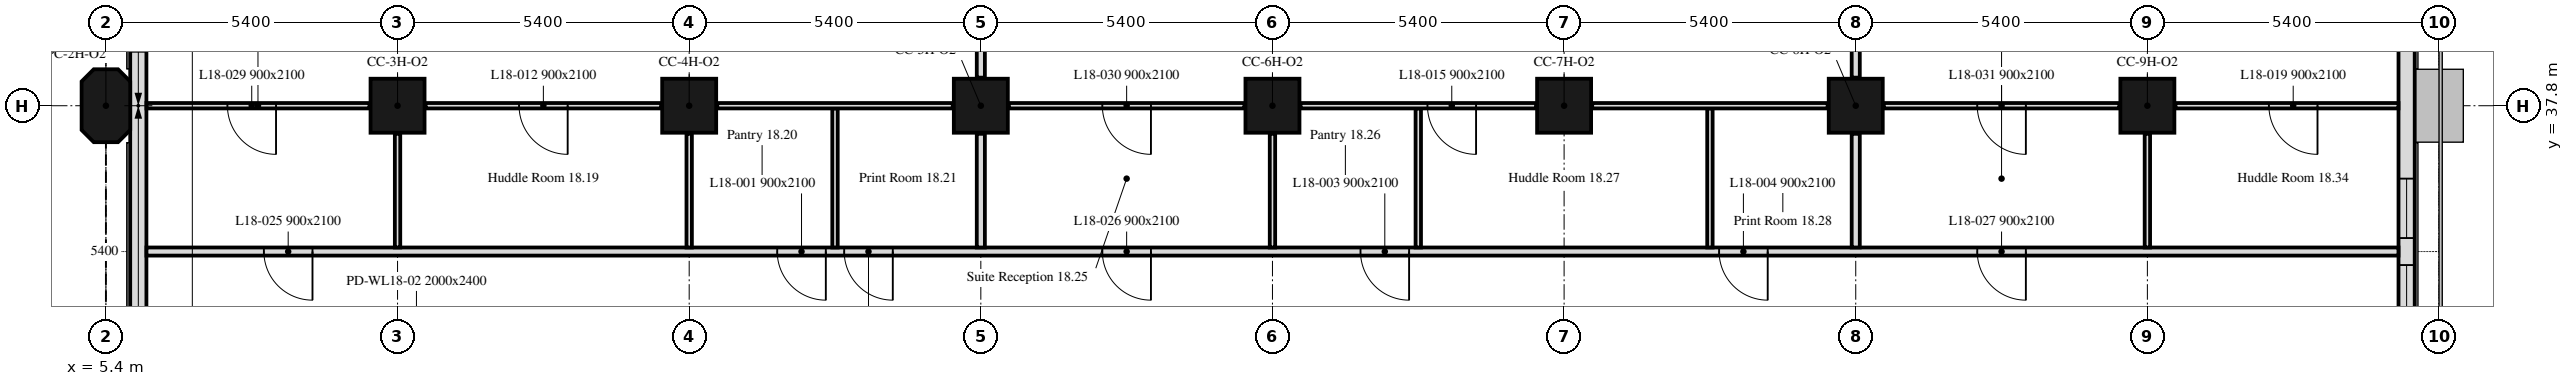
"""IFC4 building model, lengths in metres.
Left out: names, types, materials, properties, quantities, classifications, styles, units other than length and angle.
Written with IfcOpenShell. Run it as: python <this file> out.ifc"""

import sys

from ifc_helpers import new_model, si_unit, direction, frame, frame_2d, origin, origin_2d, place, context, subcontext, project, spatial, polyline, rectangle, outline, extrude, element, fill, save


model = new_model("IFC4")
c1 = context("Model", 3, precision=1e-05, world=origin(), true_north=direction((0.0, 1.0)))
c2 = subcontext(c1, "Body", "Model", "MODEL_VIEW")
j1 = project(units=[si_unit("LENGTHUNIT", "METRE"), si_unit("PLANEANGLEUNIT", "RADIAN")], contexts=[c1])
p1 = place(None, origin())
s1 = spatial("IfcSite", under=j1, at=p1, CompositionType="ELEMENT")
p2 = place(p1, origin())
s2 = spatial("IfcBuilding", under=s1, at=p2, CompositionType="ELEMENT")
p3 = place(p2, frame((0.0, 0.0, 80.2)))
s3 = spatial("IfcBuildingStorey", under=s2, at=p3, CompositionType="ELEMENT", Elevation=80.2)
p4 = place(p3, frame((5.4, 37.8, 0.0), z_axis=(0.0, 0.0, 1.0), x_axis=(0.0, 1.0, 0.0)))
e1 = element("IfcColumn", 1, at=p4, inside=s3, PredefinedType="COLUMN", context=c2, shape_type="SweptSolid", body=[
    extrude(outline(polyline([(-0.45, -0.45), (0.45, -0.45), (0.675, -0.225), (0.675, 0.225), (0.45, 0.45), (-0.45, 0.45), (-0.675, 0.225), (-0.675, -0.225), (-0.45, -0.45)])), origin(), (0.0, 0.0, 1.0), 3.5),
])
for number, where, z_axis, x_axis in (
    (2, (10.8, 37.8, 0.0), (0.0, 0.0, 1.0), (1.0, 0.0, 0.0)),
    (3, (16.2, 37.8, 0.0), (0.0, 0.0, 1.0), (1.0, 0.0, 0.0)),
    (4, (21.6, 37.8, 0.0), (0.0, 0.0, 1.0), (1.0, 0.0, 0.0)),
    (5, (27.0, 37.8, 0.0), (0.0, 0.0, 1.0), (1.0, 0.0, 0.0)),
    (6, (32.4, 37.8, 0.0), (0.0, 0.0, 1.0), (1.0, 0.0, 0.0)),
    (7, (37.8, 37.8, 0.0), (0.0, 0.0, 1.0), (1.0, 0.0, 0.0)),
    (8, (43.2, 37.8, 0.0), (0.0, 0.0, 1.0), (1.0, 0.0, 0.0)),
):
    element("IfcColumn", number, at=place(p3, frame(where, z_axis=z_axis, x_axis=x_axis)), inside=s3, PredefinedType="COLUMN", context=c2, shape_type="SweptSolid", body=[
        extrude(rectangle(XDim=1.0, YDim=1.0, at=origin_2d()), origin(), (0.0, 0.0, 1.0), 3.5),
    ])
p5 = place(p3, frame((48.0, 10.986, 0.0), z_axis=(0.0, 0.0, 1.0), x_axis=(0.0, 1.0, 0.0)))
e9 = element("IfcWall", 9, at=p5, inside=s3, PredefinedType="SOLIDWALL", context=c2, shape_type="SweptSolid", body=[
    extrude(rectangle(XDim=32.027, YDim=0.3, at=frame_2d((16.014, 0.0))), origin(), (0.0, 0.0, 1.0), 3.5),
])
p6 = place(p5, frame((1.164, 0.0, 0.9)))
e10 = element("IfcOpeningElement", 10, at=p6, cuts=e9, PredefinedType="OPENING", context=c2, shape_type="SweptSolid", body=[
    extrude(rectangle(XDim=1.1, YDim=1.7, at=frame_2d((0.55, 0.85))), frame((0.0, 0.16, 0.0), z_axis=(0.0, -1.0, 0.0), x_axis=(1.0, 0.0, 0.0)), (0.0, 0.0, 1.0), 0.32),
])
p7 = place(p5, frame((2.764, 0.0, 0.9)))
e11 = element("IfcOpeningElement", 11, at=p7, cuts=e9, PredefinedType="OPENING", context=c2, shape_type="SweptSolid", body=[
    extrude(rectangle(XDim=1.1, YDim=1.7, at=frame_2d((0.55, 0.85))), frame((0.0, 0.16, 0.0), z_axis=(0.0, -1.0, 0.0), x_axis=(1.0, 0.0, 0.0)), (0.0, 0.0, 1.0), 0.32),
])
p8 = place(p5, frame((11.614, 0.0, 0.9)))
e12 = element("IfcOpeningElement", 12, at=p8, cuts=e9, PredefinedType="OPENING", context=c2, shape_type="SweptSolid", body=[
    extrude(rectangle(XDim=3.4, YDim=1.7, at=frame_2d((1.7, 0.85))), frame((0.0, 0.16, 0.0), z_axis=(0.0, -1.0, 0.0), x_axis=(1.0, 0.0, 0.0)), (0.0, 0.0, 1.0), 0.32),
])
p9 = place(p5, frame((22.764, 0.0, 0.9)))
e13 = element("IfcOpeningElement", 13, at=p9, cuts=e9, PredefinedType="OPENING", context=c2, shape_type="SweptSolid", body=[
    extrude(rectangle(XDim=1.1, YDim=1.7, at=frame_2d((0.55, 0.85))), frame((0.0, 0.16, 0.0), z_axis=(0.0, -1.0, 0.0), x_axis=(1.0, 0.0, 0.0)), (0.0, 0.0, 1.0), 0.32),
])
p10 = place(p5, frame((24.364, 0.0, 0.9)))
e14 = element("IfcOpeningElement", 14, at=p10, cuts=e9, PredefinedType="OPENING", context=c2, shape_type="SweptSolid", body=[
    extrude(rectangle(XDim=1.1, YDim=1.7, at=frame_2d((0.55, 0.85))), frame((0.0, 0.16, 0.0), z_axis=(0.0, -1.0, 0.0), x_axis=(1.0, 0.0, 0.0)), (0.0, 0.0, 1.0), 0.32),
])
p11 = place(p3, frame((6.0, 43.014, 0.0), z_axis=(0.0, 0.0, 1.0), x_axis=(0.0, -1.0, 0.0)))
e15 = element("IfcWall", 15, at=p11, inside=s3, PredefinedType="SOLIDWALL", context=c2, shape_type="SweptSolid", body=[
    extrude(rectangle(XDim=10.614, YDim=0.3, at=frame_2d((5.307, 0.0))), origin(), (0.0, 0.0, 1.0), 3.5),
])
p12 = place(p11, frame((0.814, 0.0, 0.9)))
e16 = element("IfcOpeningElement", 16, at=p12, cuts=e15, PredefinedType="OPENING", context=c2, shape_type="SweptSolid", body=[
    extrude(rectangle(XDim=3.4, YDim=1.7, at=frame_2d((1.7, 0.85))), frame((0.0, 0.16, 0.0), z_axis=(0.0, -1.0, 0.0), x_axis=(1.0, 0.0, 0.0)), (0.0, 0.0, 1.0), 0.32),
])
p13 = place(p3, frame((47.849, 35.1, 0.0), z_axis=(0.0, 0.0, 1.0), x_axis=(-1.0, 0.0, 0.0)))
e17 = element("IfcWall", 17, at=p13, inside=s3, PredefinedType="PARTITIONING", context=c2, shape_type="SweptSolid", body=[
    extrude(rectangle(XDim=41.698, YDim=0.15, at=frame_2d((20.849, 0.0))), origin(), (0.0, 0.0, 1.0), 2.75),
])
p14 = place(p13, frame((29.119, 0.0, 0.0)))
e18 = element("IfcOpeningElement", 18, at=p14, cuts=e17, PredefinedType="OPENING", context=c2, shape_type="SweptSolid", body=[
    extrude(rectangle(XDim=0.9, YDim=2.1, at=frame_2d((0.45, 1.05))), frame((0.0, 0.075, 0.0), z_axis=(0.0, -1.0, 0.0), x_axis=(1.0, 0.0, 0.0)), (0.0, 0.0, 1.0), 0.15),
])
p15 = place(p13, frame((27.879, 0.0, 0.0)))
e19 = element("IfcOpeningElement", 19, at=p15, cuts=e17, PredefinedType="OPENING", context=c2, shape_type="SweptSolid", body=[
    extrude(rectangle(XDim=0.9, YDim=2.1, at=frame_2d((0.45, 1.05))), frame((0.0, 0.075, 0.0), z_axis=(0.0, -1.0, 0.0), x_axis=(1.0, 0.0, 0.0)), (0.0, 0.0, 1.0), 0.15),
])
p16 = place(p13, frame((18.319, 0.0, 0.0)))
e20 = element("IfcOpeningElement", 20, at=p16, cuts=e17, PredefinedType="OPENING", context=c2, shape_type="SweptSolid", body=[
    extrude(rectangle(XDim=0.9, YDim=2.1, at=frame_2d((0.45, 1.05))), frame((0.0, 0.075, 0.0), z_axis=(0.0, -1.0, 0.0), x_axis=(1.0, 0.0, 0.0)), (0.0, 0.0, 1.0), 0.15),
])
p17 = place(p13, frame((11.679, 0.0, 0.0)))
e21 = element("IfcOpeningElement", 21, at=p17, cuts=e17, PredefinedType="OPENING", context=c2, shape_type="SweptSolid", body=[
    extrude(rectangle(XDim=0.9, YDim=2.1, at=frame_2d((0.45, 1.05))), frame((0.0, 0.075, 0.0), z_axis=(0.0, -1.0, 0.0), x_axis=(1.0, 0.0, 0.0)), (0.0, 0.0, 1.0), 0.15),
])
p18 = place(p13, frame((38.624, 0.0, 0.0)))
e22 = element("IfcOpeningElement", 22, at=p18, cuts=e17, PredefinedType="OPENING", context=c2, shape_type="SweptSolid", body=[
    extrude(rectangle(XDim=0.9, YDim=2.1, at=frame_2d((0.45, 1.05))), frame((0.0, 0.075, 0.0), z_axis=(0.0, -1.0, 0.0), x_axis=(1.0, 0.0, 0.0)), (0.0, 0.0, 1.0), 0.15),
])
p19 = place(p13, frame((23.099, 0.0, 0.0)))
e23 = element("IfcOpeningElement", 23, at=p19, cuts=e17, PredefinedType="OPENING", context=c2, shape_type="SweptSolid", body=[
    extrude(rectangle(XDim=0.9, YDim=2.1, at=frame_2d((0.45, 1.05))), frame((0.0, 0.075, 0.0), z_axis=(0.0, -1.0, 0.0), x_axis=(1.0, 0.0, 0.0)), (0.0, 0.0, 1.0), 0.15),
])
p20 = place(p13, frame((6.899, 0.0, 0.0)))
e24 = element("IfcOpeningElement", 24, at=p20, cuts=e17, PredefinedType="OPENING", context=c2, shape_type="SweptSolid", body=[
    extrude(rectangle(XDim=0.9, YDim=2.1, at=frame_2d((0.45, 1.05))), frame((0.0, 0.075, 0.0), z_axis=(0.0, -1.0, 0.0), x_axis=(1.0, 0.0, 0.0)), (0.0, 0.0, 1.0), 0.15),
])
p21 = place(p3, frame((10.28, 37.8, 0.0), z_axis=(0.0, 0.0, 1.0), x_axis=(-1.0, 0.0, 0.0)))
e25 = element("IfcWall", 25, at=p21, inside=s3, PredefinedType="PARTITIONING", context=c2, shape_type="SweptSolid", body=[
    extrude(rectangle(XDim=4.129, YDim=0.1, at=frame_2d((2.064, 0.0))), origin(), (0.0, 0.0, 1.0), 3.5),
])
p22 = place(p21, frame((1.73, 0.0, 0.0)))
e26 = element("IfcOpeningElement", 26, at=p22, cuts=e25, PredefinedType="OPENING", context=c2, shape_type="SweptSolid", body=[
    extrude(rectangle(XDim=0.9, YDim=2.1, at=frame_2d((0.45, 1.05))), frame((0.0, 0.05, 0.0), z_axis=(0.0, -1.0, 0.0), x_axis=(1.0, 0.0, 0.0)), (0.0, 0.0, 1.0), 0.1),
])
p23 = place(p3, frame((10.8, 35.175, 0.0), z_axis=(0.0, 0.0, 1.0), x_axis=(0.0, 1.0, 0.0)))
e27 = element("IfcWall", 27, at=p23, inside=s3, PredefinedType="PARTITIONING", context=c2, shape_type="SweptSolid", body=[
    extrude(rectangle(XDim=2.105, YDim=0.1, at=frame_2d((1.052, 0.0))), origin(), (0.0, 0.0, 1.0), 3.5),
])
p24 = place(p3, frame((16.2, 35.175, 0.0), z_axis=(0.0, 0.0, 1.0), x_axis=(0.0, 1.0, 0.0)))
e28 = element("IfcWall", 28, at=p24, inside=s3, PredefinedType="PARTITIONING", context=c2, shape_type="SweptSolid", body=[
    extrude(rectangle(XDim=2.105, YDim=0.1, at=frame_2d((1.052, 0.0))), origin(), (0.0, 0.0, 1.0), 2.75),
])
p25 = place(p3, frame((15.68, 37.8, 0.0), z_axis=(0.0, 0.0, 1.0), x_axis=(-1.0, 0.0, 0.0)))
e29 = element("IfcWall", 29, at=p25, inside=s3, PredefinedType="PARTITIONING", context=c2, shape_type="SweptSolid", body=[
    extrude(rectangle(XDim=4.36, YDim=0.1, at=frame_2d((2.18, 0.0))), origin(), (0.0, 0.0, 1.0), 3.5),
])
p26 = place(p25, frame((1.73, 0.0, 0.0)))
e30 = element("IfcOpeningElement", 30, at=p26, cuts=e29, PredefinedType="OPENING", context=c2, shape_type="SweptSolid", body=[
    extrude(rectangle(XDim=0.9, YDim=2.1, at=frame_2d((0.45, 1.05))), frame((0.0, 0.05, 0.0), z_axis=(0.0, -1.0, 0.0), x_axis=(1.0, 0.0, 0.0)), (0.0, 0.0, 1.0), 0.1),
])
p27 = place(p3, frame((18.9, 35.175, 0.0), z_axis=(0.0, 0.0, 1.0), x_axis=(0.0, 1.0, 0.0)))
e31 = element("IfcWall", 31, at=p27, inside=s3, PredefinedType="PARTITIONING", context=c2, shape_type="SweptSolid", body=[
    extrude(rectangle(XDim=2.575, YDim=0.1, at=frame_2d((1.288, 0.0))), origin(), (0.0, 0.0, 1.0), 3.5),
])
p28 = place(p3, frame((21.6, 35.175, 0.0), z_axis=(0.0, 0.0, 1.0), x_axis=(0.0, 1.0, 0.0)))
e32 = element("IfcWall", 32, at=p28, inside=s3, PredefinedType="PARTITIONING", context=c2, shape_type="SweptSolid", body=[
    extrude(rectangle(XDim=2.105, YDim=0.15, at=frame_2d((1.052, 0.0))), origin(), (0.0, 0.0, 1.0), 2.75),
])
p29 = place(p3, frame((21.08, 37.8, 0.0), z_axis=(0.0, 0.0, 1.0), x_axis=(-1.0, 0.0, 0.0)))
e33 = element("IfcWall", 33, at=p29, inside=s3, PredefinedType="PARTITIONING", context=c2, shape_type="SweptSolid", body=[
    extrude(rectangle(XDim=4.36, YDim=0.1, at=frame_2d((2.18, 0.0))), origin(), (0.0, 0.0, 1.0), 3.5),
])
p30 = place(p3, frame((21.6, 38.32, 0.0), z_axis=(0.0, 0.0, 1.0), x_axis=(0.0, 1.0, 0.0)))
e34 = element("IfcWall", 34, at=p30, inside=s3, PredefinedType="PARTITIONING", context=c2, shape_type="SweptSolid", body=[
    extrude(rectangle(XDim=4.36, YDim=0.15, at=frame_2d((2.18, 0.0))), origin(), (0.0, 0.0, 1.0), 2.75),
])
p31 = place(p3, frame((27.0, 35.175, 0.0), z_axis=(0.0, 0.0, 1.0), x_axis=(0.0, 1.0, 0.0)))
e35 = element("IfcWall", 35, at=p31, inside=s3, PredefinedType="PARTITIONING", context=c2, shape_type="SweptSolid", body=[
    extrude(rectangle(XDim=2.105, YDim=0.1, at=frame_2d((1.052, 0.0))), origin(), (0.0, 0.0, 1.0), 2.75),
])
p32 = place(p3, frame((26.48, 37.8, 0.0), z_axis=(0.0, 0.0, 1.0), x_axis=(-1.0, 0.0, 0.0)))
e36 = element("IfcWall", 36, at=p32, inside=s3, PredefinedType="PARTITIONING", context=c2, shape_type="SweptSolid", body=[
    extrude(rectangle(XDim=4.36, YDim=0.1, at=frame_2d((2.18, 0.0))), origin(), (0.0, 0.0, 1.0), 3.5),
])
p33 = place(p32, frame((1.73, 0.0, 0.0)))
e37 = element("IfcOpeningElement", 37, at=p33, cuts=e36, PredefinedType="OPENING", context=c2, shape_type="SweptSolid", body=[
    extrude(rectangle(XDim=0.9, YDim=2.1, at=frame_2d((0.45, 1.05))), frame((0.0, 0.05, 0.0), z_axis=(0.0, -1.0, 0.0), x_axis=(1.0, 0.0, 0.0)), (0.0, 0.0, 1.0), 0.1),
])
for number, where, z_axis, x_axis in (
    (38, (29.7, 35.175, 0.0), (0.0, 0.0, 1.0), (0.0, 1.0, 0.0)),
    (39, (35.1, 35.175, 0.0), (0.0, 0.0, 1.0), (0.0, 1.0, 0.0)),
):
    element("IfcWall", number, at=place(p3, frame(where, z_axis=z_axis, x_axis=x_axis)), inside=s3, PredefinedType="PARTITIONING", context=c2, shape_type="SweptSolid", body=[
        extrude(rectangle(XDim=2.575, YDim=0.1, at=frame_2d((1.288, 0.0))), origin(), (0.0, 0.0, 1.0), 3.5),
    ])
p34 = place(p3, frame((31.88, 37.8, 0.0), z_axis=(0.0, 0.0, 1.0), x_axis=(-1.0, 0.0, 0.0)))
e40 = element("IfcWall", 40, at=p34, inside=s3, PredefinedType="PARTITIONING", context=c2, shape_type="SweptSolid", body=[
    extrude(rectangle(XDim=4.36, YDim=0.1, at=frame_2d((2.18, 0.0))), origin(), (0.0, 0.0, 1.0), 3.5),
])
p35 = place(p34, frame((1.11, 0.0, 0.0)))
e41 = element("IfcOpeningElement", 41, at=p35, cuts=e40, PredefinedType="OPENING", context=c2, shape_type="SweptSolid", body=[
    extrude(rectangle(XDim=0.9, YDim=2.1, at=frame_2d((0.45, 1.05))), frame((0.0, 0.05, 0.0), z_axis=(0.0, -1.0, 0.0), x_axis=(1.0, 0.0, 0.0)), (0.0, 0.0, 1.0), 0.1),
])
p36 = place(p3, frame((37.8, 35.175, 0.0), z_axis=(0.0, 0.0, 1.0), x_axis=(0.0, 1.0, 0.0)))
e42 = element("IfcWall", 42, at=p36, inside=s3, PredefinedType="PARTITIONING", context=c2, shape_type="SweptSolid", body=[
    extrude(rectangle(XDim=2.105, YDim=0.15, at=frame_2d((1.052, 0.0))), origin(), (0.0, 0.0, 1.0), 2.75),
])
p37 = place(p3, frame((37.28, 37.8, 0.0), z_axis=(0.0, 0.0, 1.0), x_axis=(-1.0, 0.0, 0.0)))
e43 = element("IfcWall", 43, at=p37, inside=s3, PredefinedType="PARTITIONING", context=c2, shape_type="SweptSolid", body=[
    extrude(rectangle(XDim=4.36, YDim=0.1, at=frame_2d((2.18, 0.0))), origin(), (0.0, 0.0, 1.0), 2.75),
])
p38 = place(p3, frame((37.8, 38.32, 0.0), z_axis=(0.0, 0.0, 1.0), x_axis=(0.0, 1.0, 0.0)))
e44 = element("IfcWall", 44, at=p38, inside=s3, PredefinedType="PARTITIONING", context=c2, shape_type="SweptSolid", body=[
    extrude(rectangle(XDim=4.36, YDim=0.15, at=frame_2d((2.18, 0.0))), origin(), (0.0, 0.0, 1.0), 2.75),
])
p39 = place(p3, frame((43.2, 35.175, 0.0), z_axis=(0.0, 0.0, 1.0), x_axis=(0.0, 1.0, 0.0)))
e45 = element("IfcWall", 45, at=p39, inside=s3, PredefinedType="PARTITIONING", context=c2, shape_type="SweptSolid", body=[
    extrude(rectangle(XDim=2.105, YDim=0.1, at=frame_2d((1.052, 0.0))), origin(), (0.0, 0.0, 1.0), 3.5),
])
p40 = place(p3, frame((42.68, 37.8, 0.0), z_axis=(0.0, 0.0, 1.0), x_axis=(-1.0, 0.0, 0.0)))
e46 = element("IfcWall", 46, at=p40, inside=s3, PredefinedType="PARTITIONING", context=c2, shape_type="SweptSolid", body=[
    extrude(rectangle(XDim=4.36, YDim=0.1, at=frame_2d((2.18, 0.0))), origin(), (0.0, 0.0, 1.0), 2.75),
])
p41 = place(p40, frame((1.73, 0.0, 0.0)))
e47 = element("IfcOpeningElement", 47, at=p41, cuts=e46, PredefinedType="OPENING", context=c2, shape_type="SweptSolid", body=[
    extrude(rectangle(XDim=0.9, YDim=2.1, at=frame_2d((0.45, 1.05))), frame((0.0, 0.05, 0.0), z_axis=(0.0, -1.0, 0.0), x_axis=(1.0, 0.0, 0.0)), (0.0, 0.0, 1.0), 0.1),
])
p42 = place(p3, frame((47.849, 37.8, 0.0), z_axis=(0.0, 0.0, 1.0), x_axis=(-1.0, 0.0, 0.0)))
e48 = element("IfcWall", 48, at=p42, inside=s3, PredefinedType="PARTITIONING", context=c2, shape_type="SweptSolid", body=[
    extrude(rectangle(XDim=4.129, YDim=0.1, at=frame_2d((2.064, 0.0))), origin(), (0.0, 0.0, 1.0), 2.75),
])
p43 = place(p42, frame((1.499, 0.0, 0.0)))
e49 = element("IfcOpeningElement", 49, at=p43, cuts=e48, PredefinedType="OPENING", context=c2, shape_type="SweptSolid", body=[
    extrude(rectangle(XDim=0.9, YDim=2.1, at=frame_2d((0.45, 1.05))), frame((0.0, 0.05, 0.0), z_axis=(0.0, -1.0, 0.0), x_axis=(1.0, 0.0, 0.0)), (0.0, 0.0, 1.0), 0.1),
])
p44 = place(p9, origin())
e50 = element("IfcWindow", 50, at=p44, inside=s3, PartitioningType="SINGLE_PANEL", PredefinedType="WINDOW", context=c2, shape_type="SweptSolid", body=[
    extrude(rectangle(XDim=1.1, YDim=1.7, at=frame_2d((0.55, 0.85))), frame((0.0, 0.03, 0.0), z_axis=(0.0, -1.0, 0.0), x_axis=(1.0, 0.0, 0.0)), (0.0, 0.0, 1.0), 0.06),
])
fill(e13, e50)
p45 = place(p10, origin())
e51 = element("IfcWindow", 51, at=p45, inside=s3, PartitioningType="SINGLE_PANEL", PredefinedType="WINDOW", context=c2, shape_type="SweptSolid", body=[
    extrude(rectangle(XDim=1.1, YDim=1.7, at=frame_2d((0.55, 0.85))), frame((0.0, 0.03, 0.0), z_axis=(0.0, -1.0, 0.0), x_axis=(1.0, 0.0, 0.0)), (0.0, 0.0, 1.0), 0.06),
])
fill(e14, e51)
p46 = place(p14, origin())
e52 = element("IfcDoor", 52, at=p46, inside=s3, OperationType="SINGLE_SWING_LEFT", PredefinedType="DOOR", context=c2, shape_type="SweptSolid", body=[
    extrude(rectangle(XDim=0.9, YDim=2.1, at=frame_2d((0.45, 1.05))), frame((0.0, 0.025, 0.0), z_axis=(0.0, -1.0, 0.0), x_axis=(1.0, 0.0, 0.0)), (0.0, 0.0, 1.0), 0.05),
])
fill(e18, e52)
p47 = place(p15, origin())
e53 = element("IfcDoor", 53, at=p47, inside=s3, OperationType="SINGLE_SWING_LEFT", PredefinedType="DOOR", context=c2, shape_type="SweptSolid", body=[
    extrude(rectangle(XDim=0.9, YDim=2.1, at=frame_2d((0.45, 1.05))), frame((0.0, 0.025, 0.0), z_axis=(0.0, -1.0, 0.0), x_axis=(1.0, 0.0, 0.0)), (0.0, 0.0, 1.0), 0.05),
])
fill(e19, e53)
p48 = place(p16, origin())
e54 = element("IfcDoor", 54, at=p48, inside=s3, OperationType="SINGLE_SWING_LEFT", PredefinedType="DOOR", context=c2, shape_type="SweptSolid", body=[
    extrude(rectangle(XDim=0.9, YDim=2.1, at=frame_2d((0.45, 1.05))), frame((0.0, 0.025, 0.0), z_axis=(0.0, -1.0, 0.0), x_axis=(1.0, 0.0, 0.0)), (0.0, 0.0, 1.0), 0.05),
])
fill(e20, e54)
p49 = place(p17, origin())
e55 = element("IfcDoor", 55, at=p49, inside=s3, OperationType="SINGLE_SWING_LEFT", PredefinedType="DOOR", context=c2, shape_type="SweptSolid", body=[
    extrude(rectangle(XDim=0.9, YDim=2.1, at=frame_2d((0.45, 1.05))), frame((0.0, 0.025, 0.0), z_axis=(0.0, -1.0, 0.0), x_axis=(1.0, 0.0, 0.0)), (0.0, 0.0, 1.0), 0.05),
])
fill(e21, e55)
p50 = place(p26, origin())
e56 = element("IfcDoor", 56, at=p50, inside=s3, OperationType="SINGLE_SWING_LEFT", PredefinedType="DOOR", context=c2, shape_type="SweptSolid", body=[
    extrude(rectangle(XDim=0.9, YDim=2.1, at=frame_2d((0.45, 1.05))), frame((0.0, 0.025, 0.0), z_axis=(0.0, -1.0, 0.0), x_axis=(1.0, 0.0, 0.0)), (0.0, 0.0, 1.0), 0.05),
])
fill(e30, e56)
p51 = place(p35, origin())
e57 = element("IfcDoor", 57, at=p51, inside=s3, OperationType="SINGLE_SWING_RIGHT", PredefinedType="DOOR", context=c2, shape_type="SweptSolid", body=[
    extrude(rectangle(XDim=0.9, YDim=2.1, at=frame_2d((0.45, 1.05))), frame((0.0, 0.025, 0.0), z_axis=(0.0, -1.0, 0.0), x_axis=(1.0, 0.0, 0.0)), (0.0, 0.0, 1.0), 0.05),
])
fill(e41, e57)
p52 = place(p43, origin())
e58 = element("IfcDoor", 58, at=p52, inside=s3, OperationType="SINGLE_SWING_LEFT", PredefinedType="DOOR", context=c2, shape_type="SweptSolid", body=[
    extrude(rectangle(XDim=0.9, YDim=2.1, at=frame_2d((0.45, 1.05))), frame((0.0, 0.025, 0.0), z_axis=(0.0, -1.0, 0.0), x_axis=(1.0, 0.0, 0.0)), (0.0, 0.0, 1.0), 0.05),
])
fill(e49, e58)
p53 = place(p18, origin())
e59 = element("IfcDoor", 59, at=p53, inside=s3, OperationType="SINGLE_SWING_LEFT", PredefinedType="DOOR", context=c2, shape_type="SweptSolid", body=[
    extrude(rectangle(XDim=0.9, YDim=2.1, at=frame_2d((0.45, 1.05))), frame((0.0, 0.025, 0.0), z_axis=(0.0, -1.0, 0.0), x_axis=(1.0, 0.0, 0.0)), (0.0, 0.0, 1.0), 0.05),
])
fill(e22, e59)
p54 = place(p19, origin())
e60 = element("IfcDoor", 60, at=p54, inside=s3, OperationType="SINGLE_SWING_LEFT", PredefinedType="DOOR", context=c2, shape_type="SweptSolid", body=[
    extrude(rectangle(XDim=0.9, YDim=2.1, at=frame_2d((0.45, 1.05))), frame((0.0, 0.025, 0.0), z_axis=(0.0, -1.0, 0.0), x_axis=(1.0, 0.0, 0.0)), (0.0, 0.0, 1.0), 0.05),
])
fill(e23, e60)
p55 = place(p20, origin())
e61 = element("IfcDoor", 61, at=p55, inside=s3, OperationType="SINGLE_SWING_LEFT", PredefinedType="DOOR", context=c2, shape_type="SweptSolid", body=[
    extrude(rectangle(XDim=0.9, YDim=2.1, at=frame_2d((0.45, 1.05))), frame((0.0, 0.025, 0.0), z_axis=(0.0, -1.0, 0.0), x_axis=(1.0, 0.0, 0.0)), (0.0, 0.0, 1.0), 0.05),
])
fill(e24, e61)
p56 = place(p22, origin())
e62 = element("IfcDoor", 62, at=p56, inside=s3, OperationType="SINGLE_SWING_RIGHT", PredefinedType="DOOR", context=c2, shape_type="SweptSolid", body=[
    extrude(rectangle(XDim=0.9, YDim=2.1, at=frame_2d((0.45, 1.05))), frame((0.0, 0.025, 0.0), z_axis=(0.0, -1.0, 0.0), x_axis=(1.0, 0.0, 0.0)), (0.0, 0.0, 1.0), 0.05),
])
fill(e26, e62)
p57 = place(p33, origin())
e63 = element("IfcDoor", 63, at=p57, inside=s3, OperationType="SINGLE_SWING_LEFT", PredefinedType="DOOR", context=c2, shape_type="SweptSolid", body=[
    extrude(rectangle(XDim=0.9, YDim=2.1, at=frame_2d((0.45, 1.05))), frame((0.0, 0.025, 0.0), z_axis=(0.0, -1.0, 0.0), x_axis=(1.0, 0.0, 0.0)), (0.0, 0.0, 1.0), 0.05),
])
fill(e37, e63)
p58 = place(p41, origin())
e64 = element("IfcDoor", 64, at=p58, inside=s3, OperationType="SINGLE_SWING_RIGHT", PredefinedType="DOOR", context=c2, shape_type="SweptSolid", body=[
    extrude(rectangle(XDim=0.9, YDim=2.1, at=frame_2d((0.45, 1.05))), frame((0.0, 0.025, 0.0), z_axis=(0.0, -1.0, 0.0), x_axis=(1.0, 0.0, 0.0)), (0.0, 0.0, 1.0), 0.05),
])
fill(e47, e64)
save(model, sys.argv[1])
